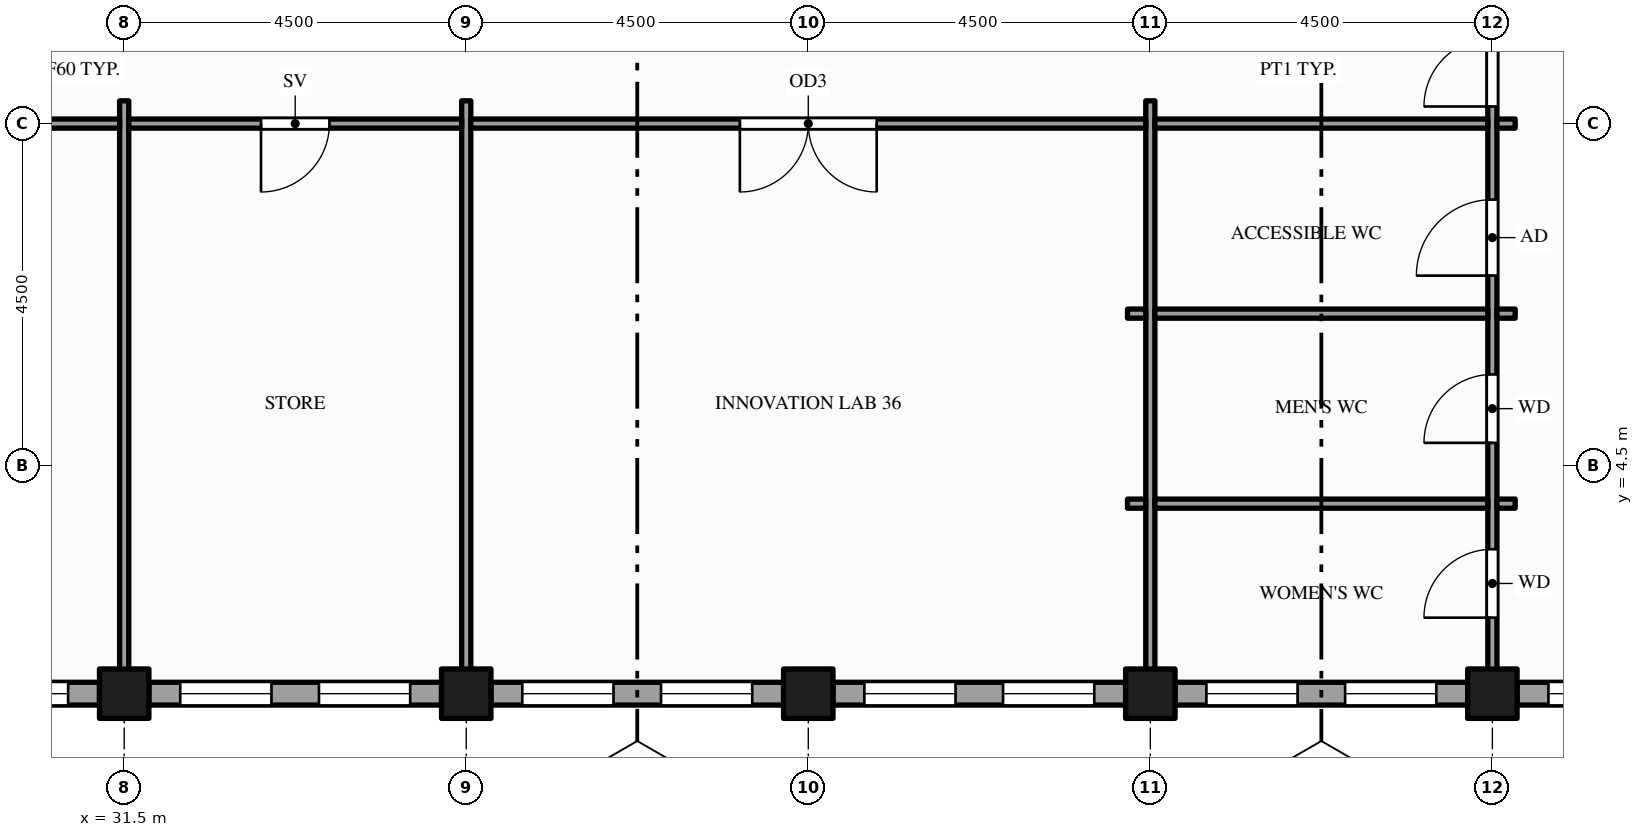
"""IFC4 building model, lengths in metres.
Left out: names, types, materials, properties, quantities, classifications, styles, units other than length and angle.
Written with IfcOpenShell. Run it as: python <this file> out.ifc"""

import sys

from ifc_helpers import new_model, si_unit, direction, frame, frame_2d, origin, origin_2d, place, context, subcontext, project, spatial, rectangle, hollow_rectangle, extrude, element, fill, save


model = new_model("IFC4")
c1 = context("Model", 3, precision=1e-05, world=origin(), true_north=direction((0.0, 1.0)))
c2 = subcontext(c1, "Body", "Model", "MODEL_VIEW")
j1 = project(units=[si_unit("LENGTHUNIT", "METRE"), si_unit("PLANEANGLEUNIT", "RADIAN")], contexts=[c1])
p1 = place(None, origin())
s1 = spatial("IfcSite", under=j1, at=p1, CompositionType="ELEMENT")
p2 = place(p1, origin())
s2 = spatial("IfcBuilding", under=s1, at=p2, CompositionType="ELEMENT")
p3 = place(p2, frame((0.0, 0.0, 249.0)))
s3 = spatial("IfcBuildingStorey", under=s2, at=p3, CompositionType="ELEMENT", Elevation=249.0)
for number, where, z_axis, x_axis in (
    (1, (31.5, 1.5, -0.15), (0.0, 0.0, 1.0), (1.0, 0.0, 0.0)),
    (2, (36.0, 1.5, -0.15), (0.0, 0.0, 1.0), (1.0, 0.0, 0.0)),
    (3, (40.5, 1.5, -0.15), (0.0, 0.0, 1.0), (1.0, 0.0, 0.0)),
    (4, (45.0, 1.5, -0.15), (0.0, 0.0, 1.0), (1.0, 0.0, 0.0)),
    (5, (49.5, 1.5, -0.15), (0.0, 0.0, 1.0), (1.0, 0.0, 0.0)),
):
    element("IfcColumn", number, at=place(p3, frame(where, z_axis=z_axis, x_axis=x_axis)), inside=s3, PredefinedType="COLUMN", context=c2, shape_type="SweptSolid", body=[
        extrude(hollow_rectangle(XDim=0.65, YDim=0.65, WallThickness=0.032, at=origin_2d()), origin(), (0.0, 0.0, 1.0), 4.0),
    ])
p4 = place(p3, frame((27.325, 1.5, 0.0), z_axis=(0.0, 0.0, 1.0), x_axis=(1.0, 0.0, 0.0)))
e6 = element("IfcWall", 6, at=p4, inside=s3, PredefinedType="STANDARD", context=c2, shape_type="SweptSolid", body=[
    extrude(rectangle(XDim=3.85, YDim=0.3, at=frame_2d((1.925, 0.0))), origin(), (0.0, 0.0, 1.0), 2.87),
])
p5 = place(p4, frame((0.413, 0.0, 0.9)))
e7 = element("IfcOpeningElement", 7, at=p5, cuts=e6, PredefinedType="OPENING", context=c2, shape_type="SweptSolid", body=[
    extrude(rectangle(XDim=1.2, YDim=1.75, at=frame_2d((0.6, 0.875))), frame((0.0, 0.16, 0.0), z_axis=(0.0, -1.0, 0.0), x_axis=(1.0, 0.0, 0.0)), (0.0, 0.0, 1.0), 0.32),
])
p6 = place(p4, frame((2.238, 0.0, 0.9)))
e8 = element("IfcOpeningElement", 8, at=p6, cuts=e6, PredefinedType="OPENING", context=c2, shape_type="SweptSolid", body=[
    extrude(rectangle(XDim=1.2, YDim=1.75, at=frame_2d((0.6, 0.875))), frame((0.0, 0.16, 0.0), z_axis=(0.0, -1.0, 0.0), x_axis=(1.0, 0.0, 0.0)), (0.0, 0.0, 1.0), 0.32),
])
p7 = place(p3, frame((31.825, 1.5, 0.0), z_axis=(0.0, 0.0, 1.0), x_axis=(1.0, 0.0, 0.0)))
e9 = element("IfcWall", 9, at=p7, inside=s3, PredefinedType="STANDARD", context=c2, shape_type="SweptSolid", body=[
    extrude(rectangle(XDim=3.85, YDim=0.3, at=frame_2d((1.925, 0.0))), origin(), (0.0, 0.0, 1.0), 2.87),
])
p8 = place(p7, frame((0.413, 0.0, 0.9)))
e10 = element("IfcOpeningElement", 10, at=p8, cuts=e9, PredefinedType="OPENING", context=c2, shape_type="SweptSolid", body=[
    extrude(rectangle(XDim=1.2, YDim=1.75, at=frame_2d((0.6, 0.875))), frame((0.0, 0.16, 0.0), z_axis=(0.0, -1.0, 0.0), x_axis=(1.0, 0.0, 0.0)), (0.0, 0.0, 1.0), 0.32),
])
p9 = place(p7, frame((2.238, 0.0, 0.9)))
e11 = element("IfcOpeningElement", 11, at=p9, cuts=e9, PredefinedType="OPENING", context=c2, shape_type="SweptSolid", body=[
    extrude(rectangle(XDim=1.2, YDim=1.75, at=frame_2d((0.6, 0.875))), frame((0.0, 0.16, 0.0), z_axis=(0.0, -1.0, 0.0), x_axis=(1.0, 0.0, 0.0)), (0.0, 0.0, 1.0), 0.32),
])
p10 = place(p3, frame((36.325, 1.5, 0.0), z_axis=(0.0, 0.0, 1.0), x_axis=(1.0, 0.0, 0.0)))
e12 = element("IfcWall", 12, at=p10, inside=s3, PredefinedType="STANDARD", context=c2, shape_type="SweptSolid", body=[
    extrude(rectangle(XDim=3.85, YDim=0.3, at=frame_2d((1.925, 0.0))), origin(), (0.0, 0.0, 1.0), 2.87),
])
p11 = place(p10, frame((0.413, 0.0, 0.9)))
e13 = element("IfcOpeningElement", 13, at=p11, cuts=e12, PredefinedType="OPENING", context=c2, shape_type="SweptSolid", body=[
    extrude(rectangle(XDim=1.2, YDim=1.75, at=frame_2d((0.6, 0.875))), frame((0.0, 0.16, 0.0), z_axis=(0.0, -1.0, 0.0), x_axis=(1.0, 0.0, 0.0)), (0.0, 0.0, 1.0), 0.32),
])
p12 = place(p10, frame((2.238, 0.0, 0.9)))
e14 = element("IfcOpeningElement", 14, at=p12, cuts=e12, PredefinedType="OPENING", context=c2, shape_type="SweptSolid", body=[
    extrude(rectangle(XDim=1.2, YDim=1.75, at=frame_2d((0.6, 0.875))), frame((0.0, 0.16, 0.0), z_axis=(0.0, -1.0, 0.0), x_axis=(1.0, 0.0, 0.0)), (0.0, 0.0, 1.0), 0.32),
])
p13 = place(p3, frame((40.825, 1.5, 0.0), z_axis=(0.0, 0.0, 1.0), x_axis=(1.0, 0.0, 0.0)))
e15 = element("IfcWall", 15, at=p13, inside=s3, PredefinedType="STANDARD", context=c2, shape_type="SweptSolid", body=[
    extrude(rectangle(XDim=3.85, YDim=0.3, at=frame_2d((1.925, 0.0))), origin(), (0.0, 0.0, 1.0), 2.87),
])
p14 = place(p13, frame((0.413, 0.0, 0.9)))
e16 = element("IfcOpeningElement", 16, at=p14, cuts=e15, PredefinedType="OPENING", context=c2, shape_type="SweptSolid", body=[
    extrude(rectangle(XDim=1.2, YDim=1.75, at=frame_2d((0.6, 0.875))), frame((0.0, 0.16, 0.0), z_axis=(0.0, -1.0, 0.0), x_axis=(1.0, 0.0, 0.0)), (0.0, 0.0, 1.0), 0.32),
])
p15 = place(p13, frame((2.238, 0.0, 0.9)))
e17 = element("IfcOpeningElement", 17, at=p15, cuts=e15, PredefinedType="OPENING", context=c2, shape_type="SweptSolid", body=[
    extrude(rectangle(XDim=1.2, YDim=1.75, at=frame_2d((0.6, 0.875))), frame((0.0, 0.16, 0.0), z_axis=(0.0, -1.0, 0.0), x_axis=(1.0, 0.0, 0.0)), (0.0, 0.0, 1.0), 0.32),
])
p16 = place(p3, frame((45.325, 1.5, 0.0), z_axis=(0.0, 0.0, 1.0), x_axis=(1.0, 0.0, 0.0)))
e18 = element("IfcWall", 18, at=p16, inside=s3, PredefinedType="STANDARD", context=c2, shape_type="SweptSolid", body=[
    extrude(rectangle(XDim=3.85, YDim=0.3, at=frame_2d((1.925, 0.0))), origin(), (0.0, 0.0, 1.0), 2.87),
])
p17 = place(p16, frame((0.413, 0.0, 0.9)))
e19 = element("IfcOpeningElement", 19, at=p17, cuts=e18, PredefinedType="OPENING", context=c2, shape_type="SweptSolid", body=[
    extrude(rectangle(XDim=1.2, YDim=1.75, at=frame_2d((0.6, 0.875))), frame((0.0, 0.16, 0.0), z_axis=(0.0, -1.0, 0.0), x_axis=(1.0, 0.0, 0.0)), (0.0, 0.0, 1.0), 0.32),
])
p18 = place(p16, frame((2.238, 0.0, 0.9)))
e20 = element("IfcOpeningElement", 20, at=p18, cuts=e18, PredefinedType="OPENING", context=c2, shape_type="SweptSolid", body=[
    extrude(rectangle(XDim=1.2, YDim=1.75, at=frame_2d((0.6, 0.875))), frame((0.0, 0.16, 0.0), z_axis=(0.0, -1.0, 0.0), x_axis=(1.0, 0.0, 0.0)), (0.0, 0.0, 1.0), 0.32),
])
p19 = place(p3, frame((49.825, 1.5, 0.0), z_axis=(0.0, 0.0, 1.0), x_axis=(1.0, 0.0, 0.0)))
e21 = element("IfcWall", 21, at=p19, inside=s3, PredefinedType="STANDARD", context=c2, shape_type="SweptSolid", body=[
    extrude(rectangle(XDim=4.175, YDim=0.3, at=frame_2d((2.087, 0.0))), origin(), (0.0, 0.0, 1.0), 2.87),
])
p20 = place(p19, frame((0.413, 0.0, 0.9)))
e22 = element("IfcOpeningElement", 22, at=p20, cuts=e21, PredefinedType="OPENING", context=c2, shape_type="SweptSolid", body=[
    extrude(rectangle(XDim=1.2, YDim=1.75, at=frame_2d((0.6, 0.875))), frame((0.0, 0.16, 0.0), z_axis=(0.0, -1.0, 0.0), x_axis=(1.0, 0.0, 0.0)), (0.0, 0.0, 1.0), 0.32),
])
p21 = place(p19, frame((2.225, 0.0, 0.9)))
e23 = element("IfcOpeningElement", 23, at=p21, cuts=e21, PredefinedType="OPENING", context=c2, shape_type="SweptSolid", body=[
    extrude(rectangle(XDim=1.55, YDim=1.75, at=frame_2d((0.775, 0.875))), frame((0.0, 0.16, 0.0), z_axis=(0.0, -1.0, 0.0), x_axis=(1.0, 0.0, 0.0)), (0.0, 0.0, 1.0), 0.32),
])
for number, where, z_axis, x_axis in (
    (24, (31.5, 1.65, 0.0), (0.0, 0.0, 1.0), (0.0, 1.0, 0.0)),
    (25, (36.0, 1.65, 0.0), (0.0, 0.0, 1.0), (0.0, 1.0, 0.0)),
    (26, (45.0, 1.65, 0.0), (0.0, 0.0, 1.0), (0.0, 1.0, 0.0)),
):
    element("IfcWall", number, at=place(p3, frame(where, z_axis=z_axis, x_axis=x_axis)), inside=s3, PredefinedType="PARTITIONING", context=c2, shape_type="SweptSolid", body=[
        extrude(rectangle(XDim=7.65, YDim=0.12, at=frame_2d((3.825, 0.0))), origin(), (0.0, 0.0, 1.0), 2.87),
    ])
p22 = place(p3, frame((49.5, 1.65, 0.0), z_axis=(0.0, 0.0, 1.0), x_axis=(0.0, 1.0, 0.0)))
e27 = element("IfcWall", 27, at=p22, inside=s3, PredefinedType="PARTITIONING", context=c2, shape_type="SweptSolid", body=[
    extrude(rectangle(XDim=22.2, YDim=0.12, at=frame_2d((11.1, 0.0))), origin(), (0.0, 0.0, 1.0), 2.87),
])
p23 = place(p22, frame((7.575, 0.0, 0.0)))
e28 = element("IfcOpeningElement", 28, at=p23, cuts=e27, PredefinedType="OPENING", context=c2, shape_type="SweptSolid", body=[
    extrude(rectangle(XDim=1.8, YDim=2.1, at=frame_2d((0.9, 1.05))), frame((0.0, 0.07, 0.0), z_axis=(0.0, -1.0, 0.0), x_axis=(1.0, 0.0, 0.0)), (0.0, 0.0, 1.0), 0.14),
])
p24 = place(p22, frame((0.85, 0.0, 0.0)))
e29 = element("IfcOpeningElement", 29, at=p24, cuts=e27, PredefinedType="OPENING", context=c2, shape_type="SweptSolid", body=[
    extrude(rectangle(XDim=0.9, YDim=2.1, at=frame_2d((0.45, 1.05))), frame((0.0, 0.07, 0.0), z_axis=(0.0, -1.0, 0.0), x_axis=(1.0, 0.0, 0.0)), (0.0, 0.0, 1.0), 0.14),
])
p25 = place(p22, frame((3.15, 0.0, 0.0)))
e30 = element("IfcOpeningElement", 30, at=p25, cuts=e27, PredefinedType="OPENING", context=c2, shape_type="SweptSolid", body=[
    extrude(rectangle(XDim=0.9, YDim=2.1, at=frame_2d((0.45, 1.05))), frame((0.0, 0.07, 0.0), z_axis=(0.0, -1.0, 0.0), x_axis=(1.0, 0.0, 0.0)), (0.0, 0.0, 1.0), 0.14),
])
p26 = place(p22, frame((5.35, 0.0, 0.0)))
e31 = element("IfcOpeningElement", 31, at=p26, cuts=e27, PredefinedType="OPENING", context=c2, shape_type="SweptSolid", body=[
    extrude(rectangle(XDim=1.0, YDim=2.1, at=frame_2d((0.5, 1.05))), frame((0.0, 0.07, 0.0), z_axis=(0.0, -1.0, 0.0), x_axis=(1.0, 0.0, 0.0)), (0.0, 0.0, 1.0), 0.14),
])
p27 = place(p3, frame((44.7, 4.0, 0.0), z_axis=(0.0, 0.0, 1.0), x_axis=(1.0, 0.0, 0.0)))
e32 = element("IfcWall", 32, at=p27, inside=s3, PredefinedType="PARTITIONING", context=c2, shape_type="SweptSolid", body=[
    extrude(rectangle(XDim=0.24, YDim=0.12, at=frame_2d((0.12, 0.0))), origin(), (0.0, 0.0, 1.0), 2.87),
])
p28 = place(p3, frame((45.06, 4.0, 0.0), z_axis=(0.0, 0.0, 1.0), x_axis=(1.0, 0.0, 0.0)))
e33 = element("IfcWall", 33, at=p28, inside=s3, PredefinedType="PARTITIONING", context=c2, shape_type="SweptSolid", body=[
    extrude(rectangle(XDim=4.38, YDim=0.12, at=frame_2d((2.19, 0.0))), origin(), (0.0, 0.0, 1.0), 2.87),
])
for number, where, z_axis, x_axis in (
    (34, (49.56, 4.0, 0.0), (0.0, 0.0, 1.0), (1.0, 0.0, 0.0)),
    (35, (44.7, 6.5, 0.0), (0.0, 0.0, 1.0), (1.0, 0.0, 0.0)),
):
    element("IfcWall", number, at=place(p3, frame(where, z_axis=z_axis, x_axis=x_axis)), inside=s3, PredefinedType="PARTITIONING", context=c2, shape_type="SweptSolid", body=[
        extrude(rectangle(XDim=0.24, YDim=0.12, at=frame_2d((0.12, 0.0))), origin(), (0.0, 0.0, 1.0), 2.87),
    ])
p29 = place(p3, frame((45.06, 6.5, 0.0), z_axis=(0.0, 0.0, 1.0), x_axis=(1.0, 0.0, 0.0)))
e36 = element("IfcWall", 36, at=p29, inside=s3, PredefinedType="PARTITIONING", context=c2, shape_type="SweptSolid", body=[
    extrude(rectangle(XDim=4.38, YDim=0.12, at=frame_2d((2.19, 0.0))), origin(), (0.0, 0.0, 1.0), 2.87),
])
p30 = place(p3, frame((49.56, 6.5, 0.0), z_axis=(0.0, 0.0, 1.0), x_axis=(1.0, 0.0, 0.0)))
e37 = element("IfcWall", 37, at=p30, inside=s3, PredefinedType="PARTITIONING", context=c2, shape_type="SweptSolid", body=[
    extrude(rectangle(XDim=0.24, YDim=0.12, at=frame_2d((0.12, 0.0))), origin(), (0.0, 0.0, 1.0), 2.87),
])
p31 = place(p3, frame((27.06, 9.0, 0.0), z_axis=(0.0, 0.0, 1.0), x_axis=(1.0, 0.0, 0.0)))
e38 = element("IfcWall", 38, at=p31, inside=s3, PredefinedType="PARTITIONING", context=c2, shape_type="SweptSolid", body=[
    extrude(rectangle(XDim=4.38, YDim=0.12, at=frame_2d((2.19, 0.0))), origin(), (0.0, 0.0, 1.0), 2.87),
])
p32 = place(p31, frame((1.74, 0.0, 0.0)))
e39 = element("IfcOpeningElement", 39, at=p32, cuts=e38, PredefinedType="OPENING", context=c2, shape_type="SweptSolid", body=[
    extrude(rectangle(XDim=0.9, YDim=2.1, at=frame_2d((0.45, 1.05))), frame((0.0, 0.07, 0.0), z_axis=(0.0, -1.0, 0.0), x_axis=(1.0, 0.0, 0.0)), (0.0, 0.0, 1.0), 0.14),
])
p33 = place(p3, frame((31.56, 9.0, 0.0), z_axis=(0.0, 0.0, 1.0), x_axis=(1.0, 0.0, 0.0)))
e40 = element("IfcWall", 40, at=p33, inside=s3, PredefinedType="PARTITIONING", context=c2, shape_type="SweptSolid", body=[
    extrude(rectangle(XDim=4.38, YDim=0.12, at=frame_2d((2.19, 0.0))), origin(), (0.0, 0.0, 1.0), 2.87),
])
p34 = place(p33, frame((1.74, 0.0, 0.0)))
e41 = element("IfcOpeningElement", 41, at=p34, cuts=e40, PredefinedType="OPENING", context=c2, shape_type="SweptSolid", body=[
    extrude(rectangle(XDim=0.9, YDim=2.1, at=frame_2d((0.45, 1.05))), frame((0.0, 0.07, 0.0), z_axis=(0.0, -1.0, 0.0), x_axis=(1.0, 0.0, 0.0)), (0.0, 0.0, 1.0), 0.14),
])
p35 = place(p3, frame((36.06, 9.0, 0.0), z_axis=(0.0, 0.0, 1.0), x_axis=(1.0, 0.0, 0.0)))
e42 = element("IfcWall", 42, at=p35, inside=s3, PredefinedType="PARTITIONING", context=c2, shape_type="SweptSolid", body=[
    extrude(rectangle(XDim=8.88, YDim=0.12, at=frame_2d((4.44, 0.0))), origin(), (0.0, 0.0, 1.0), 2.87),
])
p36 = place(p35, frame((3.54, 0.0, 0.0)))
e43 = element("IfcOpeningElement", 43, at=p36, cuts=e42, PredefinedType="OPENING", context=c2, shape_type="SweptSolid", body=[
    extrude(rectangle(XDim=1.8, YDim=2.1, at=frame_2d((0.9, 1.05))), frame((0.0, 0.07, 0.0), z_axis=(0.0, -1.0, 0.0), x_axis=(1.0, 0.0, 0.0)), (0.0, 0.0, 1.0), 0.14),
])
p37 = place(p3, frame((45.06, 9.0, 0.0), z_axis=(0.0, 0.0, 1.0), x_axis=(1.0, 0.0, 0.0)))
e44 = element("IfcWall", 44, at=p37, inside=s3, PredefinedType="PARTITIONING", context=c2, shape_type="SweptSolid", body=[
    extrude(rectangle(XDim=4.38, YDim=0.12, at=frame_2d((2.19, 0.0))), origin(), (0.0, 0.0, 1.0), 2.87),
])
p38 = place(p3, frame((49.56, 9.0, 0.0), z_axis=(0.0, 0.0, 1.0), x_axis=(1.0, 0.0, 0.0)))
e45 = element("IfcWall", 45, at=p38, inside=s3, PredefinedType="PARTITIONING", context=c2, shape_type="SweptSolid", body=[
    extrude(rectangle(XDim=0.24, YDim=0.12, at=frame_2d((0.12, 0.0))), origin(), (0.0, 0.0, 1.0), 2.87),
])
p39 = place(p6, origin())
e46 = element("IfcWindow", 46, at=p39, inside=s3, PartitioningType="SINGLE_PANEL", PredefinedType="WINDOW", context=c2, shape_type="SweptSolid", body=[
    extrude(rectangle(XDim=1.2, YDim=1.75, at=frame_2d((0.6, 0.875))), frame((0.0, 0.03, 0.0), z_axis=(0.0, -1.0, 0.0), x_axis=(1.0, 0.0, 0.0)), (0.0, 0.0, 1.0), 0.06),
])
fill(e8, e46)
p40 = place(p8, origin())
e47 = element("IfcWindow", 47, at=p40, inside=s3, PartitioningType="SINGLE_PANEL", PredefinedType="WINDOW", context=c2, shape_type="SweptSolid", body=[
    extrude(rectangle(XDim=1.2, YDim=1.75, at=frame_2d((0.6, 0.875))), frame((0.0, 0.03, 0.0), z_axis=(0.0, -1.0, 0.0), x_axis=(1.0, 0.0, 0.0)), (0.0, 0.0, 1.0), 0.06),
])
fill(e10, e47)
p41 = place(p9, origin())
e48 = element("IfcWindow", 48, at=p41, inside=s3, PartitioningType="SINGLE_PANEL", PredefinedType="WINDOW", context=c2, shape_type="SweptSolid", body=[
    extrude(rectangle(XDim=1.2, YDim=1.75, at=frame_2d((0.6, 0.875))), frame((0.0, 0.03, 0.0), z_axis=(0.0, -1.0, 0.0), x_axis=(1.0, 0.0, 0.0)), (0.0, 0.0, 1.0), 0.06),
])
fill(e11, e48)
p42 = place(p11, origin())
e49 = element("IfcWindow", 49, at=p42, inside=s3, PartitioningType="SINGLE_PANEL", PredefinedType="WINDOW", context=c2, shape_type="SweptSolid", body=[
    extrude(rectangle(XDim=1.2, YDim=1.75, at=frame_2d((0.6, 0.875))), frame((0.0, 0.03, 0.0), z_axis=(0.0, -1.0, 0.0), x_axis=(1.0, 0.0, 0.0)), (0.0, 0.0, 1.0), 0.06),
])
fill(e13, e49)
p43 = place(p12, origin())
e50 = element("IfcWindow", 50, at=p43, inside=s3, PartitioningType="SINGLE_PANEL", PredefinedType="WINDOW", context=c2, shape_type="SweptSolid", body=[
    extrude(rectangle(XDim=1.2, YDim=1.75, at=frame_2d((0.6, 0.875))), frame((0.0, 0.03, 0.0), z_axis=(0.0, -1.0, 0.0), x_axis=(1.0, 0.0, 0.0)), (0.0, 0.0, 1.0), 0.06),
])
fill(e14, e50)
p44 = place(p14, origin())
e51 = element("IfcWindow", 51, at=p44, inside=s3, PartitioningType="SINGLE_PANEL", PredefinedType="WINDOW", context=c2, shape_type="SweptSolid", body=[
    extrude(rectangle(XDim=1.2, YDim=1.75, at=frame_2d((0.6, 0.875))), frame((0.0, 0.03, 0.0), z_axis=(0.0, -1.0, 0.0), x_axis=(1.0, 0.0, 0.0)), (0.0, 0.0, 1.0), 0.06),
])
fill(e16, e51)
p45 = place(p15, origin())
e52 = element("IfcWindow", 52, at=p45, inside=s3, PartitioningType="SINGLE_PANEL", PredefinedType="WINDOW", context=c2, shape_type="SweptSolid", body=[
    extrude(rectangle(XDim=1.2, YDim=1.75, at=frame_2d((0.6, 0.875))), frame((0.0, 0.03, 0.0), z_axis=(0.0, -1.0, 0.0), x_axis=(1.0, 0.0, 0.0)), (0.0, 0.0, 1.0), 0.06),
])
fill(e17, e52)
p46 = place(p17, origin())
e53 = element("IfcWindow", 53, at=p46, inside=s3, PartitioningType="SINGLE_PANEL", PredefinedType="WINDOW", context=c2, shape_type="SweptSolid", body=[
    extrude(rectangle(XDim=1.2, YDim=1.75, at=frame_2d((0.6, 0.875))), frame((0.0, 0.03, 0.0), z_axis=(0.0, -1.0, 0.0), x_axis=(1.0, 0.0, 0.0)), (0.0, 0.0, 1.0), 0.06),
])
fill(e19, e53)
p47 = place(p18, origin())
e54 = element("IfcWindow", 54, at=p47, inside=s3, PartitioningType="SINGLE_PANEL", PredefinedType="WINDOW", context=c2, shape_type="SweptSolid", body=[
    extrude(rectangle(XDim=1.2, YDim=1.75, at=frame_2d((0.6, 0.875))), frame((0.0, 0.03, 0.0), z_axis=(0.0, -1.0, 0.0), x_axis=(1.0, 0.0, 0.0)), (0.0, 0.0, 1.0), 0.06),
])
fill(e20, e54)
p48 = place(p20, origin())
e55 = element("IfcWindow", 55, at=p48, inside=s3, PartitioningType="SINGLE_PANEL", PredefinedType="WINDOW", context=c2, shape_type="SweptSolid", body=[
    extrude(rectangle(XDim=1.2, YDim=1.75, at=frame_2d((0.6, 0.875))), frame((0.0, 0.03, 0.0), z_axis=(0.0, -1.0, 0.0), x_axis=(1.0, 0.0, 0.0)), (0.0, 0.0, 1.0), 0.06),
])
fill(e22, e55)
p49 = place(p23, origin())
e56 = element("IfcDoor", 56, at=p49, inside=s3, OperationType="DOUBLE_DOOR_SINGLE_SWING", PredefinedType="DOOR", context=c2, shape_type="SweptSolid", body=[
    extrude(rectangle(XDim=1.8, YDim=2.1, at=frame_2d((0.9, 1.05))), frame((0.0, 0.025, 0.0), z_axis=(0.0, -1.0, 0.0), x_axis=(1.0, 0.0, 0.0)), (0.0, 0.0, 1.0), 0.05),
])
fill(e28, e56)
p50 = place(p34, origin())
e57 = element("IfcDoor", 57, at=p50, inside=s3, OperationType="SINGLE_SWING_LEFT", PredefinedType="DOOR", context=c2, shape_type="SweptSolid", body=[
    extrude(rectangle(XDim=0.9, YDim=2.1, at=frame_2d((0.45, 1.05))), frame((0.0, 0.025, 0.0), z_axis=(0.0, -1.0, 0.0), x_axis=(1.0, 0.0, 0.0)), (0.0, 0.0, 1.0), 0.05),
])
fill(e41, e57)
p51 = place(p36, origin())
e58 = element("IfcDoor", 58, at=p51, inside=s3, OperationType="DOUBLE_DOOR_SINGLE_SWING", PredefinedType="DOOR", context=c2, shape_type="SweptSolid", body=[
    extrude(rectangle(XDim=1.8, YDim=2.1, at=frame_2d((0.9, 1.05))), frame((0.0, 0.025, 0.0), z_axis=(0.0, -1.0, 0.0), x_axis=(1.0, 0.0, 0.0)), (0.0, 0.0, 1.0), 0.05),
])
fill(e43, e58)
p52 = place(p24, origin())
e59 = element("IfcDoor", 59, at=p52, inside=s3, OperationType="SINGLE_SWING_LEFT", PredefinedType="DOOR", context=c2, shape_type="SweptSolid", body=[
    extrude(rectangle(XDim=0.9, YDim=2.1, at=frame_2d((0.45, 1.05))), frame((0.0, 0.025, 0.0), z_axis=(0.0, -1.0, 0.0), x_axis=(1.0, 0.0, 0.0)), (0.0, 0.0, 1.0), 0.05),
])
fill(e29, e59)
p53 = place(p25, origin())
e60 = element("IfcDoor", 60, at=p53, inside=s3, OperationType="SINGLE_SWING_LEFT", PredefinedType="DOOR", context=c2, shape_type="SweptSolid", body=[
    extrude(rectangle(XDim=0.9, YDim=2.1, at=frame_2d((0.45, 1.05))), frame((0.0, 0.025, 0.0), z_axis=(0.0, -1.0, 0.0), x_axis=(1.0, 0.0, 0.0)), (0.0, 0.0, 1.0), 0.05),
])
fill(e30, e60)
p54 = place(p26, origin())
e61 = element("IfcDoor", 61, at=p54, inside=s3, OperationType="SINGLE_SWING_LEFT", PredefinedType="DOOR", context=c2, shape_type="SweptSolid", body=[
    extrude(rectangle(XDim=1.0, YDim=2.1, at=frame_2d((0.5, 1.05))), frame((0.0, 0.025, 0.0), z_axis=(0.0, -1.0, 0.0), x_axis=(1.0, 0.0, 0.0)), (0.0, 0.0, 1.0), 0.05),
])
fill(e31, e61)
save(model, sys.argv[1])
